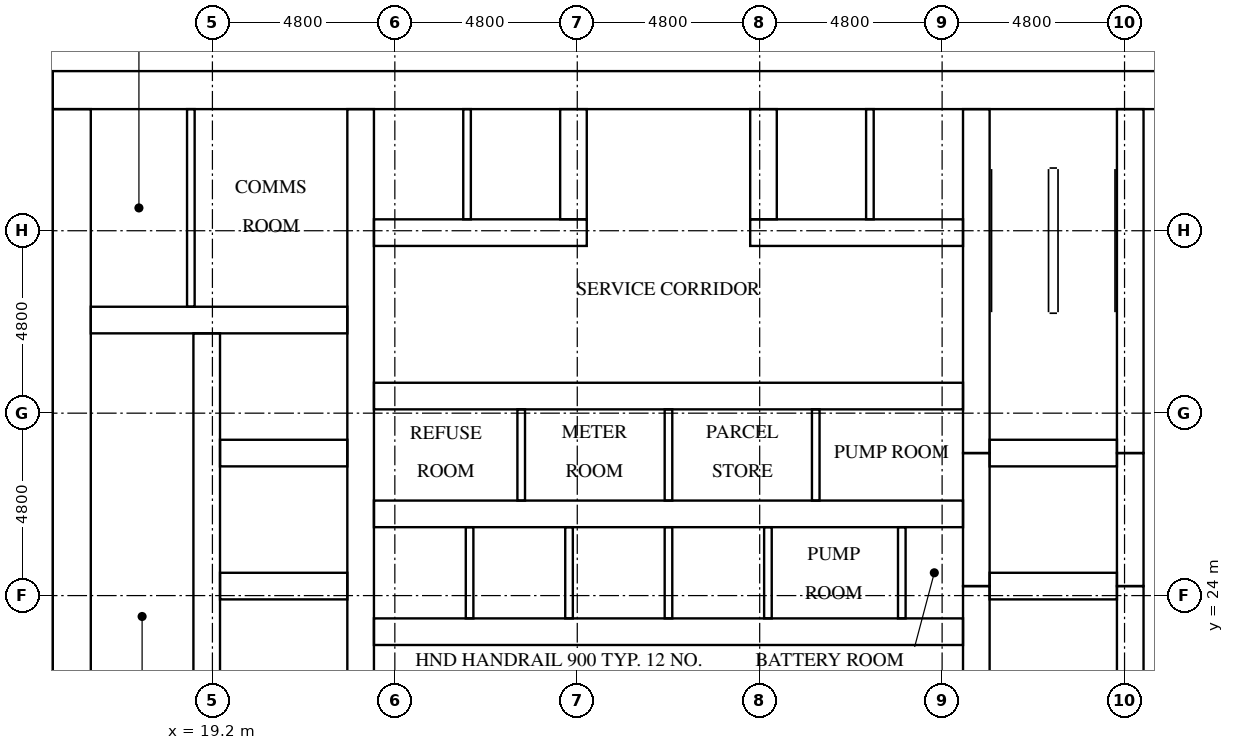
"""IFC4 building model, lengths in metres.
Left out: names, types, materials, properties, quantities, classifications, styles, units other than length and angle.
Written with IfcOpenShell. Run it as: python <this file> out.ifc"""

import sys

from ifc_helpers import new_model, si_unit, direction, frame, frame_2d, origin, place, context, subcontext, project, spatial, rectangle, extrude, element, fill, save


model = new_model("IFC4")
c1 = context("Model", 3, precision=1e-05, world=origin(), true_north=direction((0.0, 1.0)))
c2 = subcontext(c1, "Body", "Model", "MODEL_VIEW")
j1 = project(units=[si_unit("LENGTHUNIT", "METRE"), si_unit("PLANEANGLEUNIT", "RADIAN")], contexts=[c1])
p1 = place(None, origin())
s1 = spatial("IfcSite", under=j1, at=p1, CompositionType="ELEMENT")
p2 = place(p1, origin())
s2 = spatial("IfcBuilding", under=s1, at=p2, CompositionType="ELEMENT")
p3 = place(p2, frame((0.0, 0.0, 10.5)))
s3 = spatial("IfcBuildingStorey", under=s2, at=p3, CompositionType="ELEMENT", Elevation=10.5)
p4 = place(p3, frame((15.0, 37.3, 0.0), z_axis=(0.0, 0.0, 1.0), x_axis=(1.0, 0.0, 0.0)))
e1 = element("IfcWall", 1, at=p4, inside=s3, PredefinedType="SHEAR", context=c2, shape_type="SweptSolid", body=[
    extrude(rectangle(XDim=32.4, YDim=1.0, at=frame_2d((16.2, 0.0))), origin(), (0.0, 0.0, 1.0), 4.2),
])
p5 = place(p4, frame((15.3, 0.0, 0.0)))
e2 = element("IfcOpeningElement", 2, at=p5, cuts=e1, PredefinedType="OPENING", context=c2, shape_type="SweptSolid", body=[
    extrude(rectangle(XDim=1.8, YDim=2.1, at=frame_2d((0.9, 1.05))), frame((0.0, 0.51, 0.0), z_axis=(0.0, -1.0, 0.0), x_axis=(1.0, 0.0, 0.0)), (0.0, 0.0, 1.0), 1.02),
])
p6 = place(p4, frame((1.766, 0.0, 0.0)))
e3 = element("IfcOpeningElement", 3, at=p6, cuts=e1, PredefinedType="OPENING", context=c2, shape_type="SweptSolid", body=[
    extrude(rectangle(XDim=1.0, YDim=2.1, at=frame_2d((0.5, 1.05))), frame((0.0, 0.51, 0.0), z_axis=(0.0, -1.0, 0.0), x_axis=(1.0, 0.0, 0.0)), (0.0, 0.0, 1.0), 1.02),
])
p7 = place(p4, frame((5.241, 0.0, 0.0)))
e4 = element("IfcOpeningElement", 4, at=p7, cuts=e1, PredefinedType="OPENING", context=c2, shape_type="SweptSolid", body=[
    extrude(rectangle(XDim=1.0, YDim=2.1, at=frame_2d((0.5, 1.05))), frame((0.0, 0.51, 0.0), z_axis=(0.0, -1.0, 0.0), x_axis=(1.0, 0.0, 0.0)), (0.0, 0.0, 1.0), 1.02),
])
p8 = place(p3, frame((15.5, 16.0, 0.0), z_axis=(0.0, 0.0, 1.0), x_axis=(0.0, 1.0, 0.0)))
e5 = element("IfcWall", 5, at=p8, inside=s3, PredefinedType="SHEAR", context=c2, shape_type="SweptSolid", body=[
    extrude(rectangle(XDim=20.8, YDim=1.0, at=frame_2d((10.4, 0.0))), origin(), (0.0, 0.0, 1.0), 4.2),
])
p9 = place(p8, frame((4.76, 0.0, 0.0)))
e6 = element("IfcOpeningElement", 6, at=p9, cuts=e5, PredefinedType="OPENING", context=c2, shape_type="SweptSolid", body=[
    extrude(rectangle(XDim=1.2, YDim=2.1, at=frame_2d((0.6, 1.05))), frame((0.0, 0.51, 0.0), z_axis=(0.0, -1.0, 0.0), x_axis=(1.0, 0.0, 0.0)), (0.0, 0.0, 1.0), 1.02),
])
p10 = place(p3, frame((19.05, 16.0, 0.0), z_axis=(0.0, 0.0, 1.0), x_axis=(0.0, 1.0, 0.0)))
e7 = element("IfcWall", 7, at=p10, inside=s3, PredefinedType="SHEAR", context=c2, shape_type="SweptSolid", body=[
    extrude(rectangle(XDim=14.9, YDim=0.7, at=frame_2d((7.45, 0.0))), origin(), (0.0, 0.0, 1.0), 4.2),
])
p11 = place(p10, frame((9.45, 0.0, 0.0)))
e8 = element("IfcOpeningElement", 8, at=p11, cuts=e7, PredefinedType="OPENING", context=c2, shape_type="SweptSolid", body=[
    extrude(rectangle(XDim=1.1, YDim=2.1, at=frame_2d((0.55, 1.05))), frame((0.0, 0.36, 0.0), z_axis=(0.0, -1.0, 0.0), x_axis=(1.0, 0.0, 0.0)), (0.0, 0.0, 1.0), 0.72),
])
p12 = place(p10, frame((12.95, 0.0, 0.0)))
e9 = element("IfcOpeningElement", 9, at=p12, cuts=e7, PredefinedType="OPENING", context=c2, shape_type="SweptSolid", body=[
    extrude(rectangle(XDim=1.1, YDim=2.1, at=frame_2d((0.55, 1.05))), frame((0.0, 0.36, 0.0), z_axis=(0.0, -1.0, 0.0), x_axis=(1.0, 0.0, 0.0)), (0.0, 0.0, 1.0), 0.72),
])
p13 = place(p10, frame((0.2, 0.0, 0.0)))
e10 = element("IfcOpeningElement", 10, at=p13, cuts=e7, PredefinedType="OPENING", context=c2, shape_type="SweptSolid", body=[
    extrude(rectangle(XDim=1.2, YDim=2.1, at=frame_2d((0.6, 1.05))), frame((0.0, 0.36, 0.0), z_axis=(0.0, -1.0, 0.0), x_axis=(1.0, 0.0, 0.0)), (0.0, 0.0, 1.0), 0.72),
])
p14 = place(p3, frame((23.1, 16.0, 0.0), z_axis=(0.0, 0.0, 1.0), x_axis=(0.0, 1.0, 0.0)))
e11 = element("IfcWall", 11, at=p14, inside=s3, PredefinedType="SHEAR", context=c2, shape_type="SweptSolid", body=[
    extrude(rectangle(XDim=20.8, YDim=0.7, at=frame_2d((10.4, 0.0))), origin(), (0.0, 0.0, 1.0), 4.2),
])
p15 = place(p3, frame((39.3, 16.0, 0.0), z_axis=(0.0, 0.0, 1.0), x_axis=(0.0, 1.0, 0.0)))
e12 = element("IfcWall", 12, at=p15, inside=s3, PredefinedType="SHEAR", context=c2, shape_type="SweptSolid", body=[
    extrude(rectangle(XDim=8.25, YDim=0.7, at=frame_2d((4.125, 0.0))), origin(), (0.0, 0.0, 1.0), 4.2),
])
p16 = place(p3, frame((39.3, 24.25, 0.0), z_axis=(0.0, 0.0, 1.0), x_axis=(0.0, 1.0, 0.0)))
e13 = element("IfcWall", 13, at=p16, inside=s3, PredefinedType="SHEAR", context=c2, shape_type="SweptSolid", body=[
    extrude(rectangle(XDim=3.5, YDim=0.7, at=frame_2d((1.75, 0.0))), origin(), (0.0, 0.0, 1.0), 4.2),
])
p17 = place(p3, frame((39.3, 27.75, 0.0), z_axis=(0.0, 0.0, 1.0), x_axis=(0.0, 1.0, 0.0)))
e14 = element("IfcWall", 14, at=p17, inside=s3, PredefinedType="SHEAR", context=c2, shape_type="SweptSolid", body=[
    extrude(rectangle(XDim=9.05, YDim=0.7, at=frame_2d((4.525, 0.0))), origin(), (0.0, 0.0, 1.0), 4.2),
])
p18 = place(p3, frame((43.35, 16.0, 0.0), z_axis=(0.0, 0.0, 1.0), x_axis=(0.0, 1.0, 0.0)))
e15 = element("IfcWall", 15, at=p18, inside=s3, PredefinedType="SHEAR", context=c2, shape_type="SweptSolid", body=[
    extrude(rectangle(XDim=8.25, YDim=0.7, at=frame_2d((4.125, 0.0))), origin(), (0.0, 0.0, 1.0), 4.2),
])
p19 = place(p18, frame((0.2, 0.0, 0.0)))
e16 = element("IfcOpeningElement", 16, at=p19, cuts=e15, PredefinedType="OPENING", context=c2, shape_type="SweptSolid", body=[
    extrude(rectangle(XDim=1.2, YDim=2.1, at=frame_2d((0.6, 1.05))), frame((0.0, 0.36, 0.0), z_axis=(0.0, -1.0, 0.0), x_axis=(1.0, 0.0, 0.0)), (0.0, 0.0, 1.0), 0.72),
])
p20 = place(p3, frame((43.35, 24.25, 0.0), z_axis=(0.0, 0.0, 1.0), x_axis=(0.0, 1.0, 0.0)))
e17 = element("IfcWall", 17, at=p20, inside=s3, PredefinedType="SHEAR", context=c2, shape_type="SweptSolid", body=[
    extrude(rectangle(XDim=3.5, YDim=0.7, at=frame_2d((1.75, 0.0))), origin(), (0.0, 0.0, 1.0), 4.2),
])
p21 = place(p20, frame((1.2, 0.0, 0.0)))
e18 = element("IfcOpeningElement", 18, at=p21, cuts=e17, PredefinedType="OPENING", context=c2, shape_type="SweptSolid", body=[
    extrude(rectangle(XDim=1.1, YDim=2.1, at=frame_2d((0.55, 1.05))), frame((0.0, 0.36, 0.0), z_axis=(0.0, -1.0, 0.0), x_axis=(1.0, 0.0, 0.0)), (0.0, 0.0, 1.0), 0.72),
])
p22 = place(p3, frame((43.35, 27.75, 0.0), z_axis=(0.0, 0.0, 1.0), x_axis=(0.0, 1.0, 0.0)))
e19 = element("IfcWall", 19, at=p22, inside=s3, PredefinedType="SHEAR", context=c2, shape_type="SweptSolid", body=[
    extrude(rectangle(XDim=9.05, YDim=0.7, at=frame_2d((4.525, 0.0))), origin(), (0.0, 0.0, 1.0), 4.2),
])
p23 = place(p22, frame((7.65, 0.0, 0.0)))
e20 = element("IfcOpeningElement", 20, at=p23, cuts=e19, PredefinedType="OPENING", context=c2, shape_type="SweptSolid", body=[
    extrude(rectangle(XDim=1.2, YDim=2.1, at=frame_2d((0.6, 1.05))), frame((0.0, 0.36, 0.0), z_axis=(0.0, -1.0, 0.0), x_axis=(1.0, 0.0, 0.0)), (0.0, 0.0, 1.0), 0.72),
])
for number, where, z_axis, x_axis in (
    (21, (19.4, 24.25, 0.0), (0.0, 0.0, 1.0), (1.0, 0.0, 0.0)),
    (22, (19.4, 27.75, 0.0), (0.0, 0.0, 1.0), (1.0, 0.0, 0.0)),
):
    element("IfcWall", number, at=place(p3, frame(where, z_axis=z_axis, x_axis=x_axis)), inside=s3, PredefinedType="SHEAR", context=c2, shape_type="SweptSolid", body=[
        extrude(rectangle(XDim=3.35, YDim=0.7, at=frame_2d((1.675, 0.0))), origin(), (0.0, 0.0, 1.0), 4.2),
    ])
p24 = place(p3, frame((16.0, 31.25, 0.0), z_axis=(0.0, 0.0, 1.0), x_axis=(1.0, 0.0, 0.0)))
e23 = element("IfcWall", 23, at=p24, inside=s3, PredefinedType="SHEAR", context=c2, shape_type="SweptSolid", body=[
    extrude(rectangle(XDim=6.75, YDim=0.7, at=frame_2d((3.375, 0.0))), origin(), (0.0, 0.0, 1.0), 4.2),
])
for number, where, z_axis, x_axis in (
    (24, (39.65, 24.25, 0.0), (0.0, 0.0, 1.0), (1.0, 0.0, 0.0)),
    (25, (39.65, 27.75, 0.0), (0.0, 0.0, 1.0), (1.0, 0.0, 0.0)),
):
    element("IfcWall", number, at=place(p3, frame(where, z_axis=z_axis, x_axis=x_axis)), inside=s3, PredefinedType="SHEAR", context=c2, shape_type="SweptSolid", body=[
        extrude(rectangle(XDim=3.35, YDim=0.7, at=frame_2d((1.675, 0.0))), origin(), (0.0, 0.0, 1.0), 4.2),
    ])
p25 = place(p3, frame((23.45, 23.05, 0.0), z_axis=(0.0, 0.0, 1.0), x_axis=(1.0, 0.0, 0.0)))
e26 = element("IfcWall", 26, at=p25, inside=s3, PredefinedType="SHEAR", context=c2, shape_type="SweptSolid", body=[
    extrude(rectangle(XDim=15.5, YDim=0.7, at=frame_2d((7.75, 0.0))), origin(), (0.0, 0.0, 1.0), 4.2),
])
p26 = place(p25, frame((0.658, 0.0, 0.0)))
e27 = element("IfcOpeningElement", 27, at=p26, cuts=e26, PredefinedType="OPENING", context=c2, shape_type="SweptSolid", body=[
    extrude(rectangle(XDim=1.1, YDim=2.1, at=frame_2d((0.55, 1.05))), frame((0.0, 0.36, 0.0), z_axis=(0.0, -1.0, 0.0), x_axis=(1.0, 0.0, 0.0)), (0.0, 0.0, 1.0), 0.72),
])
p27 = place(p25, frame((3.275, 0.0, 0.0)))
e28 = element("IfcOpeningElement", 28, at=p27, cuts=e26, PredefinedType="OPENING", context=c2, shape_type="SweptSolid", body=[
    extrude(rectangle(XDim=1.1, YDim=2.1, at=frame_2d((0.55, 1.05))), frame((0.0, 0.36, 0.0), z_axis=(0.0, -1.0, 0.0), x_axis=(1.0, 0.0, 0.0)), (0.0, 0.0, 1.0), 0.72),
])
p28 = place(p25, frame((11.628, 0.0, 0.0)))
e29 = element("IfcOpeningElement", 29, at=p28, cuts=e26, PredefinedType="OPENING", context=c2, shape_type="SweptSolid", body=[
    extrude(rectangle(XDim=1.0, YDim=2.1, at=frame_2d((0.5, 1.05))), frame((0.0, 0.36, 0.0), z_axis=(0.0, -1.0, 0.0), x_axis=(1.0, 0.0, 0.0)), (0.0, 0.0, 1.0), 0.72),
])
p29 = place(p25, frame((14.245, 0.0, 0.0)))
e30 = element("IfcOpeningElement", 30, at=p29, cuts=e26, PredefinedType="OPENING", context=c2, shape_type="SweptSolid", body=[
    extrude(rectangle(XDim=1.0, YDim=2.1, at=frame_2d((0.5, 1.05))), frame((0.0, 0.36, 0.0), z_axis=(0.0, -1.0, 0.0), x_axis=(1.0, 0.0, 0.0)), (0.0, 0.0, 1.0), 0.72),
])
p30 = place(p3, frame((23.45, 26.15, 0.0), z_axis=(0.0, 0.0, 1.0), x_axis=(1.0, 0.0, 0.0)))
e31 = element("IfcWall", 31, at=p30, inside=s3, PredefinedType="SHEAR", context=c2, shape_type="SweptSolid", body=[
    extrude(rectangle(XDim=15.5, YDim=0.7, at=frame_2d((7.75, 0.0))), origin(), (0.0, 0.0, 1.0), 4.2),
])
p31 = place(p3, frame((23.45, 29.25, 0.0), z_axis=(0.0, 0.0, 1.0), x_axis=(1.0, 0.0, 0.0)))
e32 = element("IfcWall", 32, at=p31, inside=s3, PredefinedType="SHEAR", context=c2, shape_type="SweptSolid", body=[
    extrude(rectangle(XDim=15.5, YDim=0.7, at=frame_2d((7.75, 0.0))), origin(), (0.0, 0.0, 1.0), 4.2),
])
p32 = place(p31, frame((1.387, 0.0, 0.0)))
e33 = element("IfcOpeningElement", 33, at=p32, cuts=e32, PredefinedType="OPENING", context=c2, shape_type="SweptSolid", body=[
    extrude(rectangle(XDim=1.0, YDim=2.1, at=frame_2d((0.5, 1.05))), frame((0.0, 0.36, 0.0), z_axis=(0.0, -1.0, 0.0), x_axis=(1.0, 0.0, 0.0)), (0.0, 0.0, 1.0), 0.72),
])
p33 = place(p31, frame((5.312, 0.0, 0.0)))
e34 = element("IfcOpeningElement", 34, at=p33, cuts=e32, PredefinedType="OPENING", context=c2, shape_type="SweptSolid", body=[
    extrude(rectangle(XDim=1.0, YDim=2.1, at=frame_2d((0.5, 1.05))), frame((0.0, 0.36, 0.0), z_axis=(0.0, -1.0, 0.0), x_axis=(1.0, 0.0, 0.0)), (0.0, 0.0, 1.0), 0.72),
])
p34 = place(p31, frame((9.188, 0.0, 0.0)))
e35 = element("IfcOpeningElement", 35, at=p34, cuts=e32, PredefinedType="OPENING", context=c2, shape_type="SweptSolid", body=[
    extrude(rectangle(XDim=1.0, YDim=2.1, at=frame_2d((0.5, 1.05))), frame((0.0, 0.36, 0.0), z_axis=(0.0, -1.0, 0.0), x_axis=(1.0, 0.0, 0.0)), (0.0, 0.0, 1.0), 0.72),
])
p35 = place(p31, frame((13.113, 0.0, 0.0)))
e36 = element("IfcOpeningElement", 36, at=p35, cuts=e32, PredefinedType="OPENING", context=c2, shape_type="SweptSolid", body=[
    extrude(rectangle(XDim=1.0, YDim=2.1, at=frame_2d((0.5, 1.05))), frame((0.0, 0.36, 0.0), z_axis=(0.0, -1.0, 0.0), x_axis=(1.0, 0.0, 0.0)), (0.0, 0.0, 1.0), 0.72),
])
p36 = place(p3, frame((23.45, 33.55, 0.0), z_axis=(0.0, 0.0, 1.0), x_axis=(1.0, 0.0, 0.0)))
e37 = element("IfcWall", 37, at=p36, inside=s3, PredefinedType="SHEAR", context=c2, shape_type="SweptSolid", body=[
    extrude(rectangle(XDim=5.6, YDim=0.7, at=frame_2d((2.8, 0.0))), origin(), (0.0, 0.0, 1.0), 4.2),
])
p37 = place(p3, frame((33.35, 33.55, 0.0), z_axis=(0.0, 0.0, 1.0), x_axis=(1.0, 0.0, 0.0)))
e38 = element("IfcWall", 38, at=p37, inside=s3, PredefinedType="SHEAR", context=c2, shape_type="SweptSolid", body=[
    extrude(rectangle(XDim=5.6, YDim=0.7, at=frame_2d((2.8, 0.0))), origin(), (0.0, 0.0, 1.0), 4.2),
])
for number, where, z_axis, x_axis in (
    (39, (28.7, 33.9, 0.0), (0.0, 0.0, 1.0), (0.0, 1.0, 0.0)),
    (40, (33.7, 33.9, 0.0), (0.0, 0.0, 1.0), (0.0, 1.0, 0.0)),
):
    element("IfcWall", number, at=place(p3, frame(where, z_axis=z_axis, x_axis=x_axis)), inside=s3, PredefinedType="SHEAR", context=c2, shape_type="SweptSolid", body=[
        extrude(rectangle(XDim=2.9, YDim=0.7, at=frame_2d((1.45, 0.0))), origin(), (0.0, 0.0, 1.0), 4.2),
    ])
for number, where, z_axis, x_axis in (
    (41, (25.967, 23.4, 0.0), (0.0, 0.0, 1.0), (0.0, 1.0, 0.0)),
    (42, (28.583, 23.4, 0.0), (0.0, 0.0, 1.0), (0.0, 1.0, 0.0)),
    (43, (31.2, 23.4, 0.0), (0.0, 0.0, 1.0), (0.0, 1.0, 0.0)),
    (44, (33.817, 23.4, 0.0), (0.0, 0.0, 1.0), (0.0, 1.0, 0.0)),
):
    element("IfcWall", number, at=place(p3, frame(where, z_axis=z_axis, x_axis=x_axis)), inside=s3, PredefinedType="SOLIDWALL", context=c2, shape_type="SweptSolid", body=[
        extrude(rectangle(XDim=2.4, YDim=0.2, at=frame_2d((1.2, 0.0))), origin(), (0.0, 0.0, 1.0), 4.2),
    ])
for number, where, z_axis, x_axis in (
    (45, (25.9, 33.9, 0.0), (0.0, 0.0, 1.0), (0.0, 1.0, 0.0)),
    (46, (36.5, 33.9, 0.0), (0.0, 0.0, 1.0), (0.0, 1.0, 0.0)),
):
    element("IfcWall", number, at=place(p3, frame(where, z_axis=z_axis, x_axis=x_axis)), inside=s3, PredefinedType="SOLIDWALL", context=c2, shape_type="SweptSolid", body=[
        extrude(rectangle(XDim=2.9, YDim=0.2, at=frame_2d((1.45, 0.0))), origin(), (0.0, 0.0, 1.0), 4.2),
    ])
p38 = place(p3, frame((18.633, 31.6, 0.0), z_axis=(0.0, 0.0, 1.0), x_axis=(0.0, 1.0, 0.0)))
e47 = element("IfcWall", 47, at=p38, inside=s3, PredefinedType="PARTITIONING", context=c2, shape_type="SweptSolid", body=[
    extrude(rectangle(XDim=5.2, YDim=0.2, at=frame_2d((2.6, 0.0))), origin(), (0.0, 0.0, 1.0), 4.2),
])
p39 = place(p3, frame((37.339, 23.4, 0.0), z_axis=(0.0, 0.0, 1.0), x_axis=(0.0, 1.0, 0.0)))
e48 = element("IfcWall", 48, at=p39, inside=s3, PredefinedType="PARTITIONING", context=c2, shape_type="SweptSolid", body=[
    extrude(rectangle(XDim=2.4, YDim=0.2, at=frame_2d((1.2, 0.0))), origin(), (0.0, 0.0, 1.0), 4.2),
])
for number, where, z_axis, x_axis in (
    (49, (27.325, 26.5, 0.0), (0.0, 0.0, 1.0), (0.0, 1.0, 0.0)),
    (50, (31.2, 26.5, 0.0), (0.0, 0.0, 1.0), (0.0, 1.0, 0.0)),
    (51, (35.075, 26.5, 0.0), (0.0, 0.0, 1.0), (0.0, 1.0, 0.0)),
):
    element("IfcWall", number, at=place(p3, frame(where, z_axis=z_axis, x_axis=x_axis)), inside=s3, PredefinedType="PARTITIONING", context=c2, shape_type="SweptSolid", body=[
        extrude(rectangle(XDim=2.4, YDim=0.2, at=frame_2d((1.2, 0.0))), origin(), (0.0, 0.0, 1.0), 4.2),
    ])
p40 = place(p26, origin())
e52 = element("IfcDoor", 52, at=p40, inside=s3, OperationType="DOUBLE_DOOR_SLIDING", PredefinedType="DOOR", context=c2, shape_type="SweptSolid", body=[
    extrude(rectangle(XDim=1.1, YDim=2.1, at=frame_2d((0.55, 1.05))), frame((0.0, 0.025, 0.0), z_axis=(0.0, -1.0, 0.0), x_axis=(1.0, 0.0, 0.0)), (0.0, 0.0, 1.0), 0.05),
])
fill(e27, e52)
p41 = place(p27, origin())
e53 = element("IfcDoor", 53, at=p41, inside=s3, OperationType="DOUBLE_DOOR_SLIDING", PredefinedType="DOOR", context=c2, shape_type="SweptSolid", body=[
    extrude(rectangle(XDim=1.1, YDim=2.1, at=frame_2d((0.55, 1.05))), frame((0.0, 0.025, 0.0), z_axis=(0.0, -1.0, 0.0), x_axis=(1.0, 0.0, 0.0)), (0.0, 0.0, 1.0), 0.05),
])
fill(e28, e53)
p42 = place(p11, origin())
e54 = element("IfcDoor", 54, at=p42, inside=s3, OperationType="DOUBLE_DOOR_SLIDING", PredefinedType="DOOR", context=c2, shape_type="SweptSolid", body=[
    extrude(rectangle(XDim=1.1, YDim=2.1, at=frame_2d((0.55, 1.05))), frame((0.0, 0.025, 0.0), z_axis=(0.0, -1.0, 0.0), x_axis=(1.0, 0.0, 0.0)), (0.0, 0.0, 1.0), 0.05),
])
fill(e8, e54)
p43 = place(p12, origin())
e55 = element("IfcDoor", 55, at=p43, inside=s3, OperationType="DOUBLE_DOOR_SLIDING", PredefinedType="DOOR", context=c2, shape_type="SweptSolid", body=[
    extrude(rectangle(XDim=1.1, YDim=2.1, at=frame_2d((0.55, 1.05))), frame((0.0, 0.025, 0.0), z_axis=(0.0, -1.0, 0.0), x_axis=(1.0, 0.0, 0.0)), (0.0, 0.0, 1.0), 0.05),
])
fill(e9, e55)
p44 = place(p21, origin())
e56 = element("IfcDoor", 56, at=p44, inside=s3, OperationType="DOUBLE_DOOR_SLIDING", PredefinedType="DOOR", context=c2, shape_type="SweptSolid", body=[
    extrude(rectangle(XDim=1.1, YDim=2.1, at=frame_2d((0.55, 1.05))), frame((0.0, 0.025, 0.0), z_axis=(0.0, -1.0, 0.0), x_axis=(1.0, 0.0, 0.0)), (0.0, 0.0, 1.0), 0.05),
])
fill(e18, e56)
p45 = place(p23, origin())
e57 = element("IfcDoor", 57, at=p45, inside=s3, OperationType="SINGLE_SWING_RIGHT", PredefinedType="DOOR", context=c2, shape_type="SweptSolid", body=[
    extrude(rectangle(XDim=1.2, YDim=2.1, at=frame_2d((0.6, 1.05))), frame((0.0, 0.025, 0.0), z_axis=(0.0, -1.0, 0.0), x_axis=(1.0, 0.0, 0.0)), (0.0, 0.0, 1.0), 0.05),
])
fill(e20, e57)
p46 = place(p5, origin())
e58 = element("IfcDoor", 58, at=p46, inside=s3, OperationType="DOUBLE_DOOR_SINGLE_SWING", PredefinedType="DOOR", context=c2, shape_type="SweptSolid", body=[
    extrude(rectangle(XDim=1.8, YDim=2.1, at=frame_2d((0.9, 1.05))), frame((0.0, 0.025, 0.0), z_axis=(0.0, -1.0, 0.0), x_axis=(1.0, 0.0, 0.0)), (0.0, 0.0, 1.0), 0.05),
])
fill(e2, e58)
p47 = place(p6, origin())
e59 = element("IfcDoor", 59, at=p47, inside=s3, OperationType="SINGLE_SWING_LEFT", PredefinedType="DOOR", context=c2, shape_type="SweptSolid", body=[
    extrude(rectangle(XDim=1.0, YDim=2.1, at=frame_2d((0.5, 1.05))), frame((0.0, 0.025, 0.0), z_axis=(0.0, -1.0, 0.0), x_axis=(1.0, 0.0, 0.0)), (0.0, 0.0, 1.0), 0.05),
])
fill(e3, e59)
p48 = place(p7, origin())
e60 = element("IfcDoor", 60, at=p48, inside=s3, OperationType="SINGLE_SWING_RIGHT", PredefinedType="DOOR", context=c2, shape_type="SweptSolid", body=[
    extrude(rectangle(XDim=1.0, YDim=2.1, at=frame_2d((0.5, 1.05))), frame((0.0, 0.025, 0.0), z_axis=(0.0, -1.0, 0.0), x_axis=(1.0, 0.0, 0.0)), (0.0, 0.0, 1.0), 0.05),
])
fill(e4, e60)
p49 = place(p28, frame((1.0, 0.0, 0.0), z_axis=(0.0, 0.0, 1.0), x_axis=(-1.0, 0.0, 0.0)))
e61 = element("IfcDoor", 61, at=p49, inside=s3, OperationType="SINGLE_SWING_LEFT", PredefinedType="DOOR", context=c2, shape_type="SweptSolid", body=[
    extrude(rectangle(XDim=1.0, YDim=2.1, at=frame_2d((0.5, 1.05))), frame((0.0, 0.025, 0.0), z_axis=(0.0, -1.0, 0.0), x_axis=(1.0, 0.0, 0.0)), (0.0, 0.0, 1.0), 0.05),
])
fill(e29, e61)
p50 = place(p29, frame((1.0, 0.0, 0.0), z_axis=(0.0, 0.0, 1.0), x_axis=(-1.0, 0.0, 0.0)))
e62 = element("IfcDoor", 62, at=p50, inside=s3, OperationType="SINGLE_SWING_RIGHT", PredefinedType="DOOR", context=c2, shape_type="SweptSolid", body=[
    extrude(rectangle(XDim=1.0, YDim=2.1, at=frame_2d((0.5, 1.05))), frame((0.0, 0.025, 0.0), z_axis=(0.0, -1.0, 0.0), x_axis=(1.0, 0.0, 0.0)), (0.0, 0.0, 1.0), 0.05),
])
fill(e30, e62)
p51 = place(p32, origin())
e63 = element("IfcDoor", 63, at=p51, inside=s3, OperationType="SINGLE_SWING_LEFT", PredefinedType="DOOR", context=c2, shape_type="SweptSolid", body=[
    extrude(rectangle(XDim=1.0, YDim=2.1, at=frame_2d((0.5, 1.05))), frame((0.0, 0.025, 0.0), z_axis=(0.0, -1.0, 0.0), x_axis=(1.0, 0.0, 0.0)), (0.0, 0.0, 1.0), 0.05),
])
fill(e33, e63)
p52 = place(p33, origin())
e64 = element("IfcDoor", 64, at=p52, inside=s3, OperationType="SINGLE_SWING_RIGHT", PredefinedType="DOOR", context=c2, shape_type="SweptSolid", body=[
    extrude(rectangle(XDim=1.0, YDim=2.1, at=frame_2d((0.5, 1.05))), frame((0.0, 0.025, 0.0), z_axis=(0.0, -1.0, 0.0), x_axis=(1.0, 0.0, 0.0)), (0.0, 0.0, 1.0), 0.05),
])
fill(e34, e64)
p53 = place(p34, origin())
e65 = element("IfcDoor", 65, at=p53, inside=s3, OperationType="SINGLE_SWING_LEFT", PredefinedType="DOOR", context=c2, shape_type="SweptSolid", body=[
    extrude(rectangle(XDim=1.0, YDim=2.1, at=frame_2d((0.5, 1.05))), frame((0.0, 0.025, 0.0), z_axis=(0.0, -1.0, 0.0), x_axis=(1.0, 0.0, 0.0)), (0.0, 0.0, 1.0), 0.05),
])
fill(e35, e65)
p54 = place(p35, origin())
e66 = element("IfcDoor", 66, at=p54, inside=s3, OperationType="SINGLE_SWING_RIGHT", PredefinedType="DOOR", context=c2, shape_type="SweptSolid", body=[
    extrude(rectangle(XDim=1.0, YDim=2.1, at=frame_2d((0.5, 1.05))), frame((0.0, 0.025, 0.0), z_axis=(0.0, -1.0, 0.0), x_axis=(1.0, 0.0, 0.0)), (0.0, 0.0, 1.0), 0.05),
])
fill(e36, e66)
save(model, sys.argv[1])
